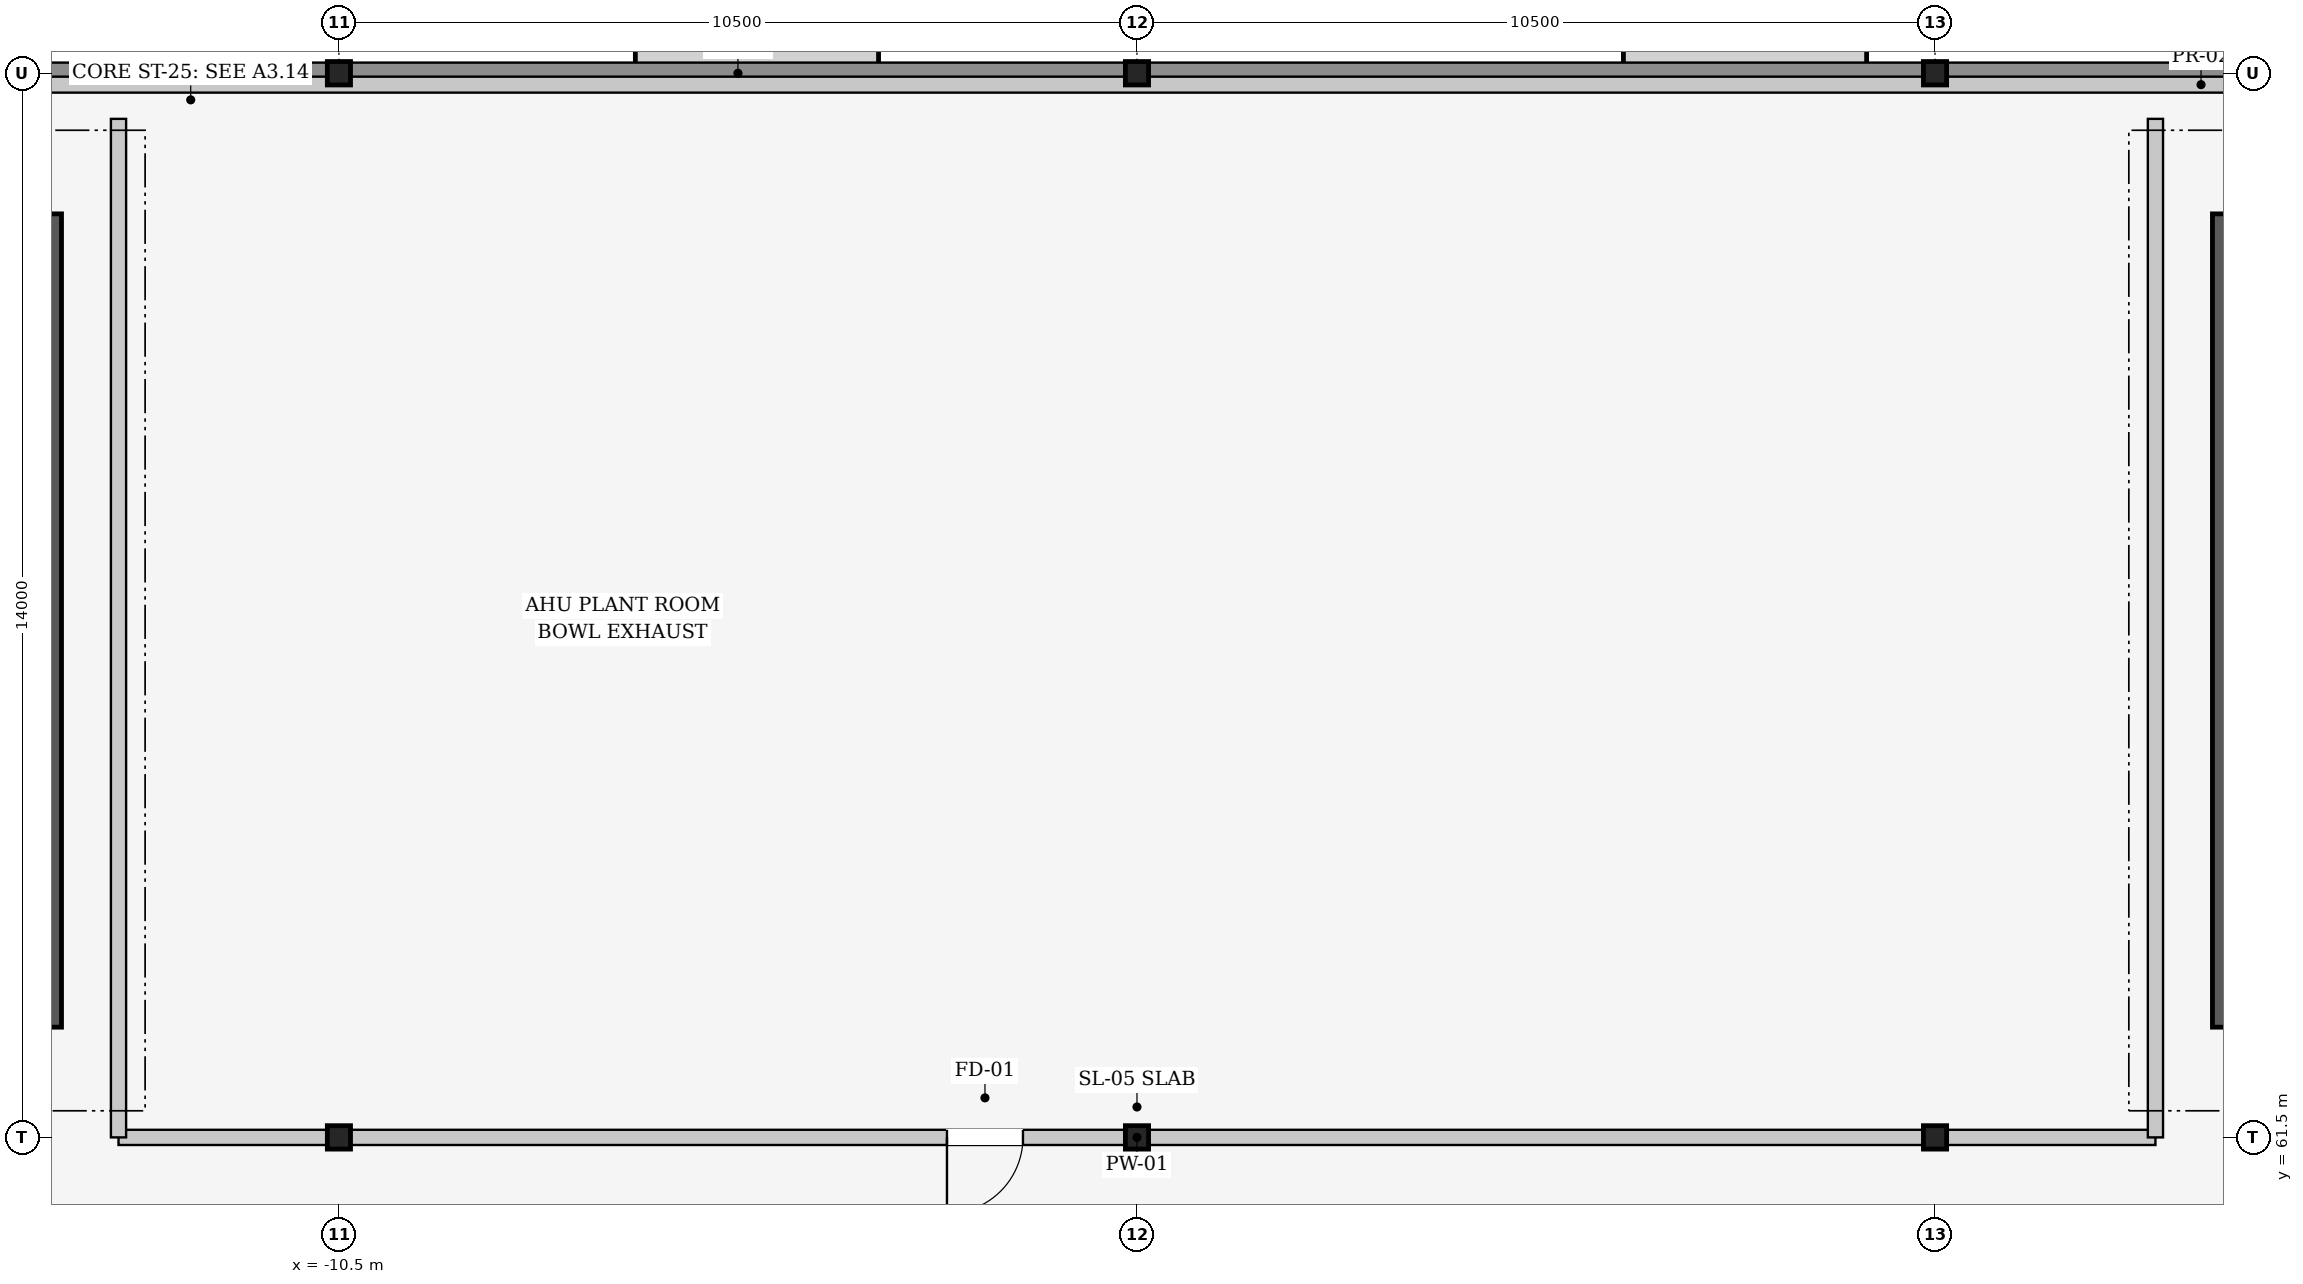
"""IFC4 building model, lengths in metres.
Left out: names, types, materials, properties, quantities, classifications, styles, units other than length and angle.
Written with IfcOpenShell. Run it as: python <this file> out.ifc"""

import sys

from ifc_helpers import new_model, si_unit, direction, frame, frame_2d, origin, origin_2d, place, context, subcontext, project, spatial, rectangle, i_section, extrude, element, fill, save


model = new_model("IFC4")
c1 = context("Model", 3, precision=1e-05, world=origin(), true_north=direction((0.0, 1.0)))
c2 = subcontext(c1, "Body", "Model", "MODEL_VIEW")
j1 = project(units=[si_unit("LENGTHUNIT", "METRE"), si_unit("PLANEANGLEUNIT", "RADIAN")], contexts=[c1])
p1 = place(None, origin())
s1 = spatial("IfcSite", under=j1, at=p1, CompositionType="ELEMENT")
p2 = place(p1, origin())
s2 = spatial("IfcBuilding", under=s1, at=p2, CompositionType="ELEMENT")
p3 = place(p2, frame((0.0, 0.0, 16.2)))
s3 = spatial("IfcBuildingStorey", under=s2, at=p3, CompositionType="ELEMENT", Elevation=16.2)
for number, where, z_axis, x_axis in (
    (1, (-10.5, 61.5, 0.0), (0.0, 0.0, 1.0), (1.0, 0.0, 0.0)),
    (2, (-10.5, 75.5, 0.0), (0.0, 0.0, 1.0), (1.0, 0.0, 0.0)),
    (3, (0.0, 61.5, 0.0), (0.0, 0.0, 1.0), (1.0, 0.0, 0.0)),
    (4, (0.0, 75.5, 0.0), (0.0, 0.0, 1.0), (1.0, 0.0, 0.0)),
    (5, (10.5, 61.5, 0.0), (0.0, 0.0, 1.0), (1.0, 0.0, 0.0)),
    (6, (10.5, 75.5, 0.0), (0.0, 0.0, 1.0), (1.0, 0.0, 0.0)),
):
    element("IfcColumn", number, at=place(p3, frame(where, z_axis=z_axis, x_axis=x_axis)), inside=s3, PredefinedType="COLUMN", context=c2, shape_type="SweptSolid", body=[
        extrude(i_section(OverallWidth=0.305, OverallDepth=0.308, WebThickness=0.01, FlangeThickness=0.015, at=origin_2d()), origin(), (0.0, 0.0, 1.0), 4.8),
    ])
p4 = place(p3, frame((-20.865, 75.5, 0.0), z_axis=(0.0, 0.0, 1.0), x_axis=(1.0, 0.0, 0.0)))
e7 = element("IfcWall", 7, at=p4, inside=s3, PredefinedType="SOLIDWALL", context=c2, shape_type="SweptSolid", body=[
    extrude(rectangle(XDim=10.231, YDim=0.28, at=frame_2d((5.115, 0.0))), origin(), (0.0, 0.0, 1.0), 3.54),
])
for number, where, z_axis, x_axis in (
    (8, (-10.365, 75.5, 0.0), (0.0, 0.0, 1.0), (1.0, 0.0, 0.0)),
    (9, (0.135, 75.5, 0.0), (0.0, 0.0, 1.0), (1.0, 0.0, 0.0)),
):
    element("IfcWall", number, at=place(p3, frame(where, z_axis=z_axis, x_axis=x_axis)), inside=s3, PredefinedType="SOLIDWALL", context=c2, shape_type="SweptSolid", body=[
        extrude(rectangle(XDim=10.231, YDim=0.28, at=frame_2d((5.115, 0.0))), origin(), (0.0, 0.0, 1.0), 3.64),
    ])
p5 = place(p3, frame((10.635, 75.5, 0.0), z_axis=(0.0, 0.0, 1.0), x_axis=(1.0, 0.0, 0.0)))
e10 = element("IfcWall", 10, at=p5, inside=s3, PredefinedType="SOLIDWALL", context=c2, shape_type="SweptSolid", body=[
    extrude(rectangle(XDim=10.231, YDim=0.28, at=frame_2d((5.115, 0.0))), origin(), (0.0, 0.0, 1.0), 3.54),
])
p6 = place(p3, frame((-36.1, 75.35, 4.8), z_axis=(0.0, 0.0, 1.0), x_axis=(1.0, 0.0, 0.0)))
e11 = element("IfcWall", 11, at=p6, inside=s3, PredefinedType="PARAPET", context=c2, shape_type="SweptSolid", body=[
    extrude(rectangle(XDim=100.2, YDim=0.21, at=frame_2d((50.1, 0.0))), origin(), (0.0, 0.0, 1.0), 1.1),
])
for number, where, z_axis, x_axis in (
    (12, (-14.275, 73.65, 0.0), (0.0, 0.0, 1.0), (0.0, -1.0, 0.0)),
    (13, (14.275, 62.95, 0.0), (0.0, 0.0, 1.0), (0.0, 1.0, 0.0)),
):
    element("IfcWall", number, at=place(p3, frame(where, z_axis=z_axis, x_axis=x_axis)), inside=s3, PredefinedType="SHEAR", context=c2, shape_type="SweptSolid", body=[
        extrude(rectangle(XDim=10.7, YDim=0.25, at=frame_2d((5.35, 0.0))), origin(), (0.0, 0.0, 1.0), 3.6),
    ])
p7 = place(p3, frame((13.4, 61.5, 0.0), z_axis=(0.0, 0.0, 1.0), x_axis=(-1.0, 0.0, 0.0)))
e14 = element("IfcWall", 14, at=p7, inside=s3, PredefinedType="PARTITIONING", context=c2, shape_type="SweptSolid", body=[
    extrude(rectangle(XDim=26.8, YDim=0.2, at=frame_2d((13.4, 0.0))), origin(), (0.0, 0.0, 1.0), 3.625),
])
p8 = place(p7, frame((14.9, 0.0, 0.0)))
e15 = element("IfcOpeningElement", 15, at=p8, cuts=e14, PredefinedType="OPENING", context=c2, shape_type="SweptSolid", body=[
    extrude(rectangle(XDim=1.0, YDim=2.15, at=frame_2d((0.5, 1.075))), frame((0.0, 0.11, 0.0), z_axis=(0.0, -1.0, 0.0), x_axis=(1.0, 0.0, 0.0)), (0.0, 0.0, 1.0), 0.22),
])
for number, where, z_axis, x_axis in (
    (16, (13.4, 74.9, 0.0), (0.0, 0.0, 1.0), (0.0, -1.0, 0.0)),
    (17, (-13.4, 61.5, 0.0), (0.0, 0.0, 1.0), (0.0, 1.0, 0.0)),
):
    element("IfcWall", number, at=place(p3, frame(where, z_axis=z_axis, x_axis=x_axis)), inside=s3, PredefinedType="PARTITIONING", context=c2, shape_type="SweptSolid", body=[
        extrude(rectangle(XDim=13.4, YDim=0.2, at=frame_2d((6.7, 0.0))), origin(), (0.0, 0.0, 1.0), 3.625),
    ])
p9 = place(p8, origin())
e18 = element("IfcDoor", 18, at=p9, inside=s3, OperationType="SINGLE_SWING_RIGHT", PredefinedType="DOOR", context=c2, shape_type="SweptSolid", body=[
    extrude(rectangle(XDim=1.0, YDim=2.15, at=frame_2d((0.5, 1.075))), frame((0.0, 0.025, 0.0), z_axis=(0.0, -1.0, 0.0), x_axis=(1.0, 0.0, 0.0)), (0.0, 0.0, 1.0), 0.05),
])
fill(e15, e18)
save(model, sys.argv[1])
